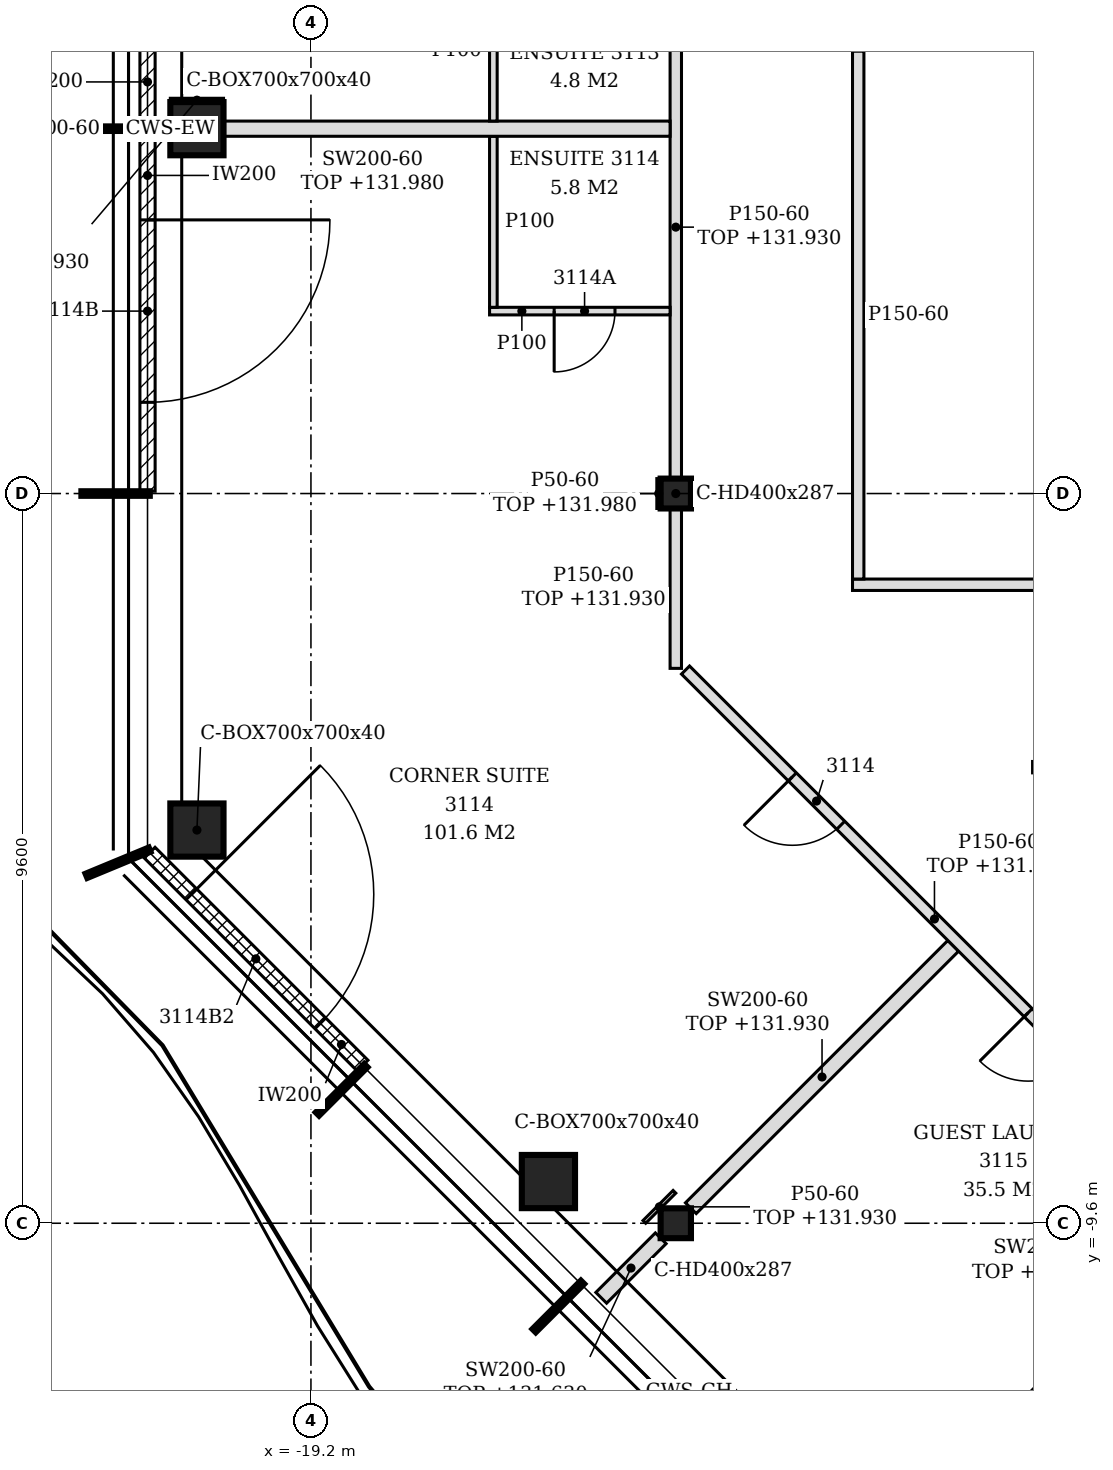
"""IFC4 building model, lengths in metres.
Left out: names, types, materials, properties, quantities, classifications, styles, units other than length and angle.
Written with IfcOpenShell. Run it as: python <this file> out.ifc"""

import sys

from ifc_helpers import new_model, si_unit, direction, frame, frame_2d, origin, origin_2d, place, context, subcontext, project, spatial, polyline, rectangle, hollow_rectangle, i_section, outline, extrude, element, fill, save


model = new_model("IFC4")
c1 = context("Model", 3, precision=1e-05, world=origin(), true_north=direction((0.0, 1.0)))
c2 = subcontext(c1, "Body", "Model", "MODEL_VIEW")
j1 = project(units=[si_unit("LENGTHUNIT", "METRE"), si_unit("PLANEANGLEUNIT", "RADIAN")], contexts=[c1])
p1 = place(None, origin())
s1 = spatial("IfcSite", under=j1, at=p1, CompositionType="ELEMENT")
p2 = place(p1, origin())
s2 = spatial("IfcBuilding", under=s1, at=p2, CompositionType="ELEMENT")
p3 = place(p2, frame((0.0, 0.0, 129.0)))
s3 = spatial("IfcBuildingStorey", under=s2, at=p3, CompositionType="ELEMENT", Elevation=129.0)
for number, where, z_axis, x_axis in (
    (1, (-20.7, 4.8, -0.15), (0.0, 0.0, 1.0), (1.0, 0.0, 0.0)),
    (2, (-20.7, -4.427, -0.15), (0.0, 0.0, 1.0), (1.0, 0.0, 0.0)),
    (3, (-16.076, -9.052, -0.15), (0.0, 0.0, 1.0), (1.0, 0.0, 0.0)),
):
    element("IfcColumn", number, at=place(p3, frame(where, z_axis=z_axis, x_axis=x_axis)), inside=s3, PredefinedType="COLUMN", context=c2, shape_type="SweptSolid", body=[
        extrude(hollow_rectangle(XDim=0.7, YDim=0.7, WallThickness=0.04, at=origin_2d()), origin(), (0.0, 0.0, 1.0), 3.6),
    ])
for number, where, z_axis, x_axis in (
    (4, (-14.4, -9.6, -0.15), (0.0, 0.0, 1.0), (1.0, 0.0, 0.0)),
    (5, (-14.4, 0.0, -0.15), (0.0, 0.0, 1.0), (1.0, 0.0, 0.0)),
):
    element("IfcColumn", number, at=place(p3, frame(where, z_axis=z_axis, x_axis=x_axis)), inside=s3, PredefinedType="COLUMN", context=c2, shape_type="SweptSolid", body=[
        extrude(i_section(OverallWidth=0.399, OverallDepth=0.393, WebThickness=0.023, FlangeThickness=0.037, FilletRadius=0.015, at=origin_2d()), origin(), (0.0, 0.0, 1.0), 3.6),
    ])
p4 = place(p3, frame((-21.35, 9.57, 0.0), z_axis=(0.0, 0.0, 1.0), x_axis=(0.0, -1.0, 0.0)))
e6 = element("IfcWall", 6, at=p4, inside=s3, PredefinedType="NOTDEFINED", context=c2, shape_type="SweptSolid", body=[
    extrude(rectangle(XDim=4.74, YDim=0.2, at=frame_2d((2.37, 0.0))), origin(), (0.0, 0.0, 1.0), 3.45),
])
p5 = place(p4, frame((1.17, 0.0, 0.0)))
e7 = element("IfcOpeningElement", 7, at=p5, cuts=e6, PredefinedType="OPENING", context=c2, shape_type="SweptSolid", body=[
    extrude(rectangle(XDim=2.4, YDim=2.4, at=frame_2d((1.2, 1.2))), frame((0.0, 0.11, 0.0), z_axis=(0.0, -1.0, 0.0), x_axis=(1.0, 0.0, 0.0)), (0.0, 0.0, 1.0), 0.22),
])
p6 = place(p3, frame((-21.35, 4.77, 0.0), z_axis=(0.0, 0.0, 1.0), x_axis=(0.0, -1.0, 0.0)))
e8 = element("IfcWall", 8, at=p6, inside=s3, PredefinedType="NOTDEFINED", context=c2, shape_type="SweptSolid", body=[
    extrude(rectangle(XDim=4.74, YDim=0.2, at=frame_2d((2.37, 0.0))), origin(), (0.0, 0.0, 1.0), 3.45),
])
p7 = place(p6, frame((1.17, 0.0, 0.0)))
e9 = element("IfcOpeningElement", 9, at=p7, cuts=e8, PredefinedType="OPENING", context=c2, shape_type="SweptSolid", body=[
    extrude(rectangle(XDim=2.4, YDim=2.4, at=frame_2d((1.2, 1.2))), frame((0.0, 0.11, 0.0), z_axis=(0.0, -1.0, 0.0), x_axis=(1.0, 0.0, 0.0)), (0.0, 0.0, 1.0), 0.22),
])
p8 = place(p3, frame((-21.322, -4.725, 0.0), z_axis=(0.0, 0.0, 1.0), x_axis=(0.707106781187, -0.707106781187, 0.0)))
e10 = element("IfcWall", 10, at=p8, inside=s3, PredefinedType="NOTDEFINED", context=c2, shape_type="SweptSolid", body=[
    extrude(rectangle(XDim=3.962, YDim=0.2, at=frame_2d((1.981, 0.0))), origin(), (0.0, 0.0, 1.0), 3.45),
])
p9 = place(p8, frame((0.775, 0.0, 0.0)))
e11 = element("IfcOpeningElement", 11, at=p9, cuts=e10, PredefinedType="OPENING", context=c2, shape_type="SweptSolid", body=[
    extrude(rectangle(XDim=2.4, YDim=2.4, at=frame_2d((1.2, 1.2))), frame((0.0, 0.11, 0.0), z_axis=(0.0, -1.0, 0.0), x_axis=(1.0, 0.0, 0.0)), (0.0, 0.0, 1.0), 0.22),
])
p10 = place(p3, frame((-11.102, -13.326, 0.0), z_axis=(0.0, 0.0, 1.0), x_axis=(0.707088722709, 0.707124839203, 0.0)))
e12 = element("IfcWall", 12, at=p10, inside=s3, PredefinedType="PARTITIONING", context=c2, shape_type="SweptSolid", body=[
    extrude(rectangle(XDim=6.76, YDim=0.2, at=frame_2d((3.38, 0.0))), origin(), (0.0, 0.0, 1.0), 2.93),
])
p11 = place(p3, frame((-15.381, -10.581, 0.0), z_axis=(0.0, 0.0, 1.0), x_axis=(0.707217034054, 0.706996511125, 0.0)))
e13 = element("IfcWall", 13, at=p11, inside=s3, PredefinedType="PARTITIONING", context=c2, shape_type="SweptSolid", body=[
    extrude(rectangle(XDim=1.107, YDim=0.2, at=frame_2d((0.554, 0.0))), origin(), (0.0, 0.0, 1.0), 2.63),
])
p12 = place(p3, frame((-14.202, -9.402, 0.0), z_axis=(0.0, 0.0, 1.0), x_axis=(0.707081776084, 0.707131785404, 0.0)))
e14 = element("IfcWall", 14, at=p12, inside=s3, PredefinedType="PARTITIONING", context=c2, shape_type="SweptSolid", body=[
    extrude(rectangle(XDim=4.882, YDim=0.2, at=frame_2d((2.441, 0.0))), origin(), (0.0, 0.0, 1.0), 2.93),
])
p13 = place(p3, frame((-8.322, -8.272, 0.0), z_axis=(0.0, 0.0, 1.0), x_axis=(-0.707106781187, 0.707106781187, 0.0)))
e15 = element("IfcWall", 15, at=p13, inside=s3, PredefinedType="PARTITIONING", context=c2, shape_type="SweptSolid", body=[
    extrude(rectangle(XDim=8.415, YDim=0.15, at=frame_2d((4.207, 0.0))), origin(), (0.0, 0.0, 1.0), 2.93),
])
p14 = place(p13, frame((5.527, 0.0, 0.0)))
e16 = element("IfcOpeningElement", 16, at=p14, cuts=e15, PredefinedType="OPENING", context=c2, shape_type="SweptSolid", body=[
    extrude(rectangle(XDim=0.9, YDim=2.1, at=frame_2d((0.45, 1.05))), frame((0.0, 0.085, 0.0), z_axis=(0.0, -1.0, 0.0), x_axis=(1.0, 0.0, 0.0)), (0.0, 0.0, 1.0), 0.17),
])
p15 = place(p13, frame((1.139, 0.0, 0.0)))
e17 = element("IfcOpeningElement", 17, at=p15, cuts=e15, PredefinedType="OPENING", context=c2, shape_type="SweptSolid", body=[
    extrude(rectangle(XDim=0.9, YDim=2.1, at=frame_2d((0.45, 1.05))), frame((0.0, 0.085, 0.0), z_axis=(0.0, -1.0, 0.0), x_axis=(1.0, 0.0, 0.0)), (0.0, 0.0, 1.0), 0.17),
])
p16 = place(p3, frame((-9.706, -3.6, 0.0), z_axis=(0.0, 0.0, 1.0), x_axis=(1.0, 0.0, 0.0)))
e18 = element("IfcWall", 18, at=p16, inside=s3, PredefinedType="PARTITIONING", context=c2, shape_type="SweptSolid", body=[
    extrude(outline(polyline([(0.0, 0.0), (4.981, 0.0), (4.981, 2.83), (4.756, 2.83), (4.754, 3.45), (0.0, 3.45), (0.0, 0.0)])), frame((0.0, 0.075, 0.0), z_axis=(0.0, -1.0, 0.0), x_axis=(1.0, 0.0, 0.0)), (0.0, 0.0, 1.0), 0.15),
])
p17 = place(p3, frame((-14.4, -2.3, 0.0), z_axis=(0.0, 0.0, 1.0), x_axis=(0.0, 1.0, 0.0)))
e19 = element("IfcWall", 19, at=p17, inside=s3, PredefinedType="PARTITIONING", context=c2, shape_type="SweptSolid", body=[
    extrude(rectangle(XDim=2.104, YDim=0.15, at=frame_2d((1.052, 0.0))), origin(), (0.0, 0.0, 1.0), 2.93),
])
p18 = place(p3, frame((-12.075, -1.2, 0.0), z_axis=(0.0, 0.0, 1.0), x_axis=(1.0, 0.0, 0.0)))
e20 = element("IfcWall", 20, at=p18, inside=s3, PredefinedType="PARTITIONING", context=c2, shape_type="SweptSolid", body=[
    extrude(outline(polyline([(0.0, 0.0), (7.35, 0.0), (7.35, 2.83), (7.125, 2.83), (7.123, 3.45), (0.0, 3.45), (0.0, 0.0)])), frame((0.0, 0.075, 0.0), z_axis=(0.0, -1.0, 0.0), x_axis=(1.0, 0.0, 0.0)), (0.0, 0.0, 1.0), 0.15),
])
p19 = place(p3, frame((-12.0, -1.125, 0.0), z_axis=(0.0, 0.0, 1.0), x_axis=(0.0, 1.0, 0.0)))
e21 = element("IfcWall", 21, at=p19, inside=s3, PredefinedType="PARTITIONING", context=c2, shape_type="SweptSolid", body=[
    extrude(outline(polyline([(0.0, 0.0), (6.944, 0.0), (6.944, 3.45), (6.025, 3.45), (6.023, 2.93), (5.825, 2.93), (5.823, 3.45), (1.225, 3.45), (1.223, 2.93), (1.025, 2.93), (1.023, 3.45), (0.0, 3.45), (0.0, 0.0)])), frame((0.0, 0.075, 0.0), z_axis=(0.0, -1.0, 0.0), x_axis=(1.0, 0.0, 0.0)), (0.0, 0.0, 1.0), 0.15),
])
p20 = place(p3, frame((-14.4, 0.197, 0.0), z_axis=(0.0, 0.0, 1.0), x_axis=(0.0, 1.0, 0.0)))
e22 = element("IfcWall", 22, at=p20, inside=s3, PredefinedType="PARTITIONING", context=c2, shape_type="SweptSolid", body=[
    extrude(rectangle(XDim=6.616, YDim=0.15, at=frame_2d((3.308, 0.0))), origin(), (0.0, 0.0, 1.0), 2.93),
])
p21 = place(p3, frame((-16.85, 2.4, 0.0), z_axis=(0.0, 0.0, 1.0), x_axis=(1.0, 0.0, 0.0)))
e23 = element("IfcWall", 23, at=p21, inside=s3, PredefinedType="PARTITIONING", context=c2, shape_type="SweptSolid", body=[
    extrude(outline(polyline([(0.0, 0.0), (2.375, 0.0), (2.375, 2.93), (2.3, 2.93), (2.298, 3.45), (0.0, 3.45), (0.0, 0.0)])), frame((0.0, 0.05, 0.0), z_axis=(0.0, -1.0, 0.0), x_axis=(1.0, 0.0, 0.0)), (0.0, 0.0, 1.0), 0.1),
])
p22 = place(p21, frame((0.85, 0.0, 0.0)))
e24 = element("IfcOpeningElement", 24, at=p22, cuts=e23, PredefinedType="OPENING", context=c2, shape_type="SweptSolid", body=[
    extrude(rectangle(XDim=0.8, YDim=2.1, at=frame_2d((0.4, 1.05))), frame((0.0, 0.06, 0.0), z_axis=(0.0, -1.0, 0.0), x_axis=(1.0, 0.0, 0.0)), (0.0, 0.0, 1.0), 0.12),
])
p23 = place(p3, frame((-16.8, 2.45, 0.0), z_axis=(0.0, 0.0, 1.0), x_axis=(0.0, 1.0, 0.0)))
e25 = element("IfcWall", 25, at=p23, inside=s3, PredefinedType="PARTITIONING", context=c2, shape_type="SweptSolid", body=[
    extrude(rectangle(XDim=2.25, YDim=0.1, at=frame_2d((1.125, 0.0))), origin(), (0.0, 0.0, 1.0), 3.45),
])
p24 = place(p3, frame((-21.25, 4.8, 0.0), z_axis=(0.0, 0.0, 1.0), x_axis=(1.0, 0.0, 0.0)))
e26 = element("IfcWall", 26, at=p24, inside=s3, PredefinedType="PARTITIONING", context=c2, shape_type="SweptSolid", body=[
    extrude(rectangle(XDim=0.2, YDim=0.2, at=frame_2d((0.1, 0.0))), origin(), (0.0, 0.0, 1.0), 3.45),
])
p25 = place(p3, frame((-20.35, 4.8, 0.0), z_axis=(0.0, 0.0, 1.0), x_axis=(1.0, 0.0, 0.0)))
e27 = element("IfcWall", 27, at=p25, inside=s3, PredefinedType="PARTITIONING", context=c2, shape_type="SweptSolid", body=[
    extrude(outline(polyline([(0.0, 0.0), (5.875, 0.0), (5.875, 2.93), (5.8, 2.93), (5.798, 2.98), (0.0, 2.98), (0.0, 0.0)])), frame((0.0, 0.1, 0.0), z_axis=(0.0, -1.0, 0.0), x_axis=(1.0, 0.0, 0.0)), (0.0, 0.0, 1.0), 0.2),
])
p26 = place(p3, frame((-16.8, 4.9, 0.0), z_axis=(0.0, 0.0, 1.0), x_axis=(0.0, 1.0, 0.0)))
e28 = element("IfcWall", 28, at=p26, inside=s3, PredefinedType="PARTITIONING", context=c2, shape_type="SweptSolid", body=[
    extrude(rectangle(XDim=1.85, YDim=0.1, at=frame_2d((0.925, 0.0))), origin(), (0.0, 0.0, 1.0), 3.45),
])
p27 = place(p3, frame((-14.814, -9.582, 0.0), z_axis=(0.0, 0.0, 1.0), x_axis=(0.707106781187, 0.707106781187, 0.0)))
e29 = element("IfcWall", 29, at=p27, inside=s3, PredefinedType="PARTITIONING", context=c2, shape_type="SweptSolid", body=[
    extrude(rectangle(XDim=0.56, YDim=0.05, at=frame_2d((0.28, 0.0))), origin(), (0.0, 0.0, 1.0), 2.93),
])
p28 = place(p3, frame((-14.625, -0.197, 0.0), z_axis=(0.0, 0.0, 1.0), x_axis=(0.0, 1.0, 0.0)))
e30 = element("IfcWall", 30, at=p28, inside=s3, PredefinedType="PARTITIONING", context=c2, shape_type="SweptSolid", body=[
    extrude(rectangle(XDim=0.393, YDim=0.05, at=frame_2d((0.197, 0.0))), origin(), (0.0, 0.0, 1.0), 2.98),
])
p29 = place(p3, frame((-21.05, 5.175, 0.0), z_axis=(0.0, 0.0, 1.0), x_axis=(1.0, 0.0, 0.0)))
e31 = element("IfcWall", 31, at=p29, inside=s3, PredefinedType="PARTITIONING", context=c2, shape_type="SweptSolid", body=[
    extrude(rectangle(XDim=0.7, YDim=0.05, at=frame_2d((0.35, 0.0))), origin(), (0.0, 0.0, 1.0), 2.93),
])
p30 = place(p7, origin())
e32 = element("IfcDoor", 32, at=p30, inside=s3, OperationType="SINGLE_SWING_LEFT", PredefinedType="DOOR", context=c2, shape_type="SweptSolid", body=[
    extrude(rectangle(XDim=2.4, YDim=2.4, at=frame_2d((1.2, 1.2))), frame((0.0, 0.025, 0.0), z_axis=(0.0, -1.0, 0.0), x_axis=(1.0, 0.0, 0.0)), (0.0, 0.0, 1.0), 0.05),
])
fill(e9, e32)
p31 = place(p9, origin())
e33 = element("IfcDoor", 33, at=p31, inside=s3, OperationType="SINGLE_SWING_LEFT", PredefinedType="DOOR", context=c2, shape_type="SweptSolid", body=[
    extrude(rectangle(XDim=2.4, YDim=2.4, at=frame_2d((1.2, 1.2))), frame((0.0, 0.025, 0.0), z_axis=(0.0, -1.0, 0.0), x_axis=(1.0, 0.0, 0.0)), (0.0, 0.0, 1.0), 0.05),
])
fill(e11, e33)
p32 = place(p14, origin())
e34 = element("IfcDoor", 34, at=p32, inside=s3, OperationType="SINGLE_SWING_RIGHT", PredefinedType="DOOR", context=c2, shape_type="SweptSolid", body=[
    extrude(rectangle(XDim=0.9, YDim=2.1, at=frame_2d((0.45, 1.05))), frame((0.0, 0.025, 0.0), z_axis=(0.0, -1.0, 0.0), x_axis=(1.0, 0.0, 0.0)), (0.0, 0.0, 1.0), 0.05),
])
fill(e16, e34)
p33 = place(p22, frame((0.8, 0.0, 0.0), z_axis=(0.0, 0.0, 1.0), x_axis=(-1.0, 0.0, 0.0)))
e35 = element("IfcDoor", 35, at=p33, inside=s3, OperationType="SINGLE_SWING_RIGHT", PredefinedType="DOOR", context=c2, shape_type="SweptSolid", body=[
    extrude(rectangle(XDim=0.8, YDim=2.1, at=frame_2d((0.4, 1.05))), frame((0.0, 0.025, 0.0), z_axis=(0.0, -1.0, 0.0), x_axis=(1.0, 0.0, 0.0)), (0.0, 0.0, 1.0), 0.05),
])
fill(e24, e35)
p34 = place(p15, origin())
e36 = element("IfcDoor", 36, at=p34, inside=s3, OperationType="SINGLE_SWING_RIGHT", PredefinedType="DOOR", context=c2, shape_type="SweptSolid", body=[
    extrude(rectangle(XDim=0.9, YDim=2.1, at=frame_2d((0.45, 1.05))), frame((0.0, 0.025, 0.0), z_axis=(0.0, -1.0, 0.0), x_axis=(1.0, 0.0, 0.0)), (0.0, 0.0, 1.0), 0.05),
])
fill(e17, e36)
save(model, sys.argv[1])
